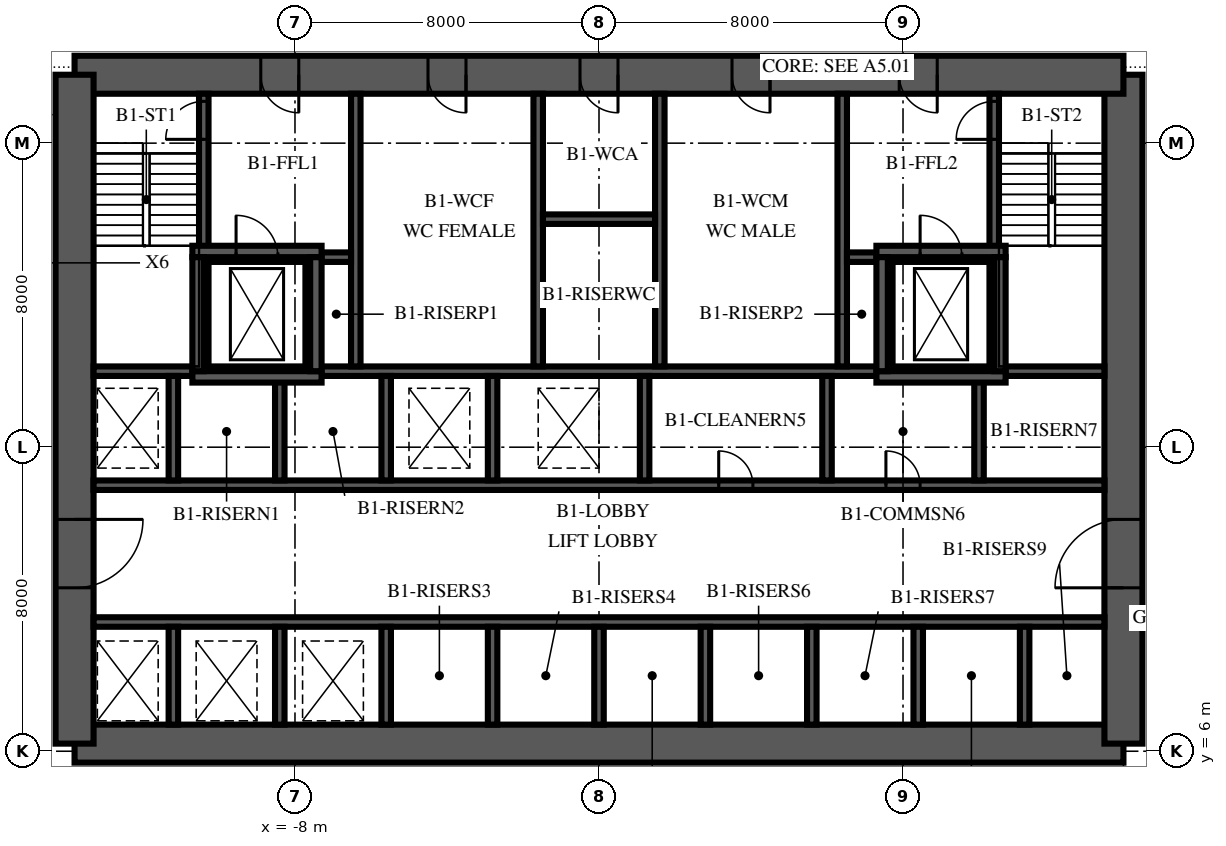
"""IFC4 building model, lengths in metres.
Left out: names, types, materials, properties, quantities, classifications, styles, units other than length and angle.
Written with IfcOpenShell. Run it as: python <this file> out.ifc"""

import sys

from ifc_helpers import new_model, si_unit, direction, frame, frame_2d, origin, place, context, subcontext, project, spatial, polyline, rectangle, outline, extrude, element, fill, save


model = new_model("IFC4")
c1 = context("Model", 3, precision=1e-05, world=origin(), true_north=direction((0.0, 1.0)))
c2 = subcontext(c1, "Body", "Model", "MODEL_VIEW")
j1 = project(units=[si_unit("LENGTHUNIT", "METRE"), si_unit("PLANEANGLEUNIT", "RADIAN")], contexts=[c1])
p1 = place(None, origin())
s1 = spatial("IfcSite", under=j1, at=p1, CompositionType="ELEMENT")
p2 = place(p1, origin())
s2 = spatial("IfcBuilding", under=s1, at=p2, CompositionType="ELEMENT")
p3 = place(p2, frame((0.0, 0.0, -7.0)))
s3 = spatial("IfcBuildingStorey", under=s2, at=p3, CompositionType="ELEMENT", Elevation=-7.0)
p4 = place(p3, frame((-13.8, 6.2, 0.0), z_axis=(0.0, 0.0, 1.0), x_axis=(1.0, 0.0, 0.0)))
e1 = element("IfcWall", 1, at=p4, inside=s3, PredefinedType="SHEAR", context=c2, shape_type="SweptSolid", body=[
    extrude(rectangle(XDim=27.6, YDim=1.0, at=frame_2d((13.8, 0.0))), origin(), (0.0, 0.0, 1.0), 7.0),
])
p5 = place(p3, frame((13.8, 6.2, 0.0), z_axis=(0.0, 0.0, 1.0), x_axis=(0.0, 1.0, 0.0)))
e2 = element("IfcWall", 2, at=p5, inside=s3, PredefinedType="SHEAR", context=c2, shape_type="SweptSolid", body=[
    extrude(outline(polyline([(0.0, -0.5), (17.6, -0.5), (17.6, 0.0), (17.1, 0.0), (17.1, 0.5), (0.5, 0.5), (0.5, 0.0), (0.0, 0.0), (0.0, -0.5)])), origin(), (0.0, 0.0, 1.0), 7.0),
])
p6 = place(p5, frame((4.1, 0.0, 0.0)))
e3 = element("IfcOpeningElement", 3, at=p6, cuts=e2, PredefinedType="OPENING", context=c2, shape_type="SweptSolid", body=[
    extrude(rectangle(XDim=1.8, YDim=2.4, at=frame_2d((0.9, 1.2))), frame((0.0, 0.515, 0.0), z_axis=(0.0, -1.0, 0.0), x_axis=(1.0, 0.0, 0.0)), (0.0, 0.0, 1.0), 1.03),
])
p7 = place(p3, frame((13.8, 23.8, 0.0), z_axis=(0.0, 0.0, 1.0), x_axis=(-1.0, 0.0, 0.0)))
e4 = element("IfcWall", 4, at=p7, inside=s3, PredefinedType="SHEAR", context=c2, shape_type="SweptSolid", body=[
    extrude(rectangle(XDim=27.6, YDim=1.0, at=frame_2d((13.8, 0.0))), origin(), (0.0, 0.0, 1.0), 7.0),
])
p8 = place(p7, frame((21.7, 0.0, 0.0)))
e5 = element("IfcOpeningElement", 5, at=p8, cuts=e4, PredefinedType="OPENING", context=c2, shape_type="SweptSolid", body=[
    extrude(rectangle(XDim=1.0, YDim=2.1, at=frame_2d((0.5, 1.05))), frame((0.0, 0.515, 0.0), z_axis=(0.0, -1.0, 0.0), x_axis=(1.0, 0.0, 0.0)), (0.0, 0.0, 1.0), 1.03),
])
p9 = place(p7, frame((4.9, 0.0, 0.0)))
e6 = element("IfcOpeningElement", 6, at=p9, cuts=e4, PredefinedType="OPENING", context=c2, shape_type="SweptSolid", body=[
    extrude(rectangle(XDim=1.0, YDim=2.1, at=frame_2d((0.5, 1.05))), frame((0.0, 0.515, 0.0), z_axis=(0.0, -1.0, 0.0), x_axis=(1.0, 0.0, 0.0)), (0.0, 0.0, 1.0), 1.03),
])
p10 = place(p7, frame((17.3, 0.0, 0.0)))
e7 = element("IfcOpeningElement", 7, at=p10, cuts=e4, PredefinedType="OPENING", context=c2, shape_type="SweptSolid", body=[
    extrude(rectangle(XDim=1.0, YDim=2.1, at=frame_2d((0.5, 1.05))), frame((0.0, 0.515, 0.0), z_axis=(0.0, -1.0, 0.0), x_axis=(1.0, 0.0, 0.0)), (0.0, 0.0, 1.0), 1.03),
])
p11 = place(p7, frame((13.3, 0.0, 0.0)))
e8 = element("IfcOpeningElement", 8, at=p11, cuts=e4, PredefinedType="OPENING", context=c2, shape_type="SweptSolid", body=[
    extrude(rectangle(XDim=1.0, YDim=2.1, at=frame_2d((0.5, 1.05))), frame((0.0, 0.515, 0.0), z_axis=(0.0, -1.0, 0.0), x_axis=(1.0, 0.0, 0.0)), (0.0, 0.0, 1.0), 1.03),
])
p12 = place(p7, frame((9.3, 0.0, 0.0)))
e9 = element("IfcOpeningElement", 9, at=p12, cuts=e4, PredefinedType="OPENING", context=c2, shape_type="SweptSolid", body=[
    extrude(rectangle(XDim=1.0, YDim=2.1, at=frame_2d((0.5, 1.05))), frame((0.0, 0.515, 0.0), z_axis=(0.0, -1.0, 0.0), x_axis=(1.0, 0.0, 0.0)), (0.0, 0.0, 1.0), 1.03),
])
p13 = place(p3, frame((-13.8, 23.8, 0.0), z_axis=(0.0, 0.0, 1.0), x_axis=(0.0, -1.0, 0.0)))
e10 = element("IfcWall", 10, at=p13, inside=s3, PredefinedType="SHEAR", context=c2, shape_type="SweptSolid", body=[
    extrude(outline(polyline([(0.0, -0.5), (17.6, -0.5), (17.6, 0.0), (17.1, 0.0), (17.1, 0.5), (0.5, 0.5), (0.5, 0.0), (0.0, 0.0), (0.0, -0.5)])), origin(), (0.0, 0.0, 1.0), 7.0),
])
p14 = place(p13, frame((11.7, 0.0, 0.0)))
e11 = element("IfcOpeningElement", 11, at=p14, cuts=e10, PredefinedType="OPENING", context=c2, shape_type="SweptSolid", body=[
    extrude(rectangle(XDim=1.8, YDim=2.4, at=frame_2d((0.9, 1.2))), frame((0.0, 0.515, 0.0), z_axis=(0.0, -1.0, 0.0), x_axis=(1.0, 0.0, 0.0)), (0.0, 0.0, 1.0), 1.03),
])
p15 = place(p3, frame((-13.3, 9.4, 0.0), z_axis=(0.0, 0.0, 1.0), x_axis=(1.0, 0.0, 0.0)))
e12 = element("IfcWall", 12, at=p15, inside=s3, PredefinedType="SHEAR", context=c2, shape_type="SweptSolid", body=[
    extrude(rectangle(XDim=26.6, YDim=0.25, at=frame_2d((13.3, 0.0))), origin(), (0.0, 0.0, 1.0), 7.0),
])
p16 = place(p3, frame((-13.3, 13.0, 0.0), z_axis=(0.0, 0.0, 1.0), x_axis=(1.0, 0.0, 0.0)))
e13 = element("IfcWall", 13, at=p16, inside=s3, PredefinedType="SHEAR", context=c2, shape_type="SweptSolid", body=[
    extrude(rectangle(XDim=26.6, YDim=0.25, at=frame_2d((13.3, 0.0))), origin(), (0.0, 0.0, 1.0), 7.0),
])
p17 = place(p16, frame((16.45, 0.0, 0.0)))
e14 = element("IfcOpeningElement", 14, at=p17, cuts=e13, PredefinedType="OPENING", context=c2, shape_type="SweptSolid", body=[
    extrude(rectangle(XDim=0.9, YDim=2.1, at=frame_2d((0.45, 1.05))), frame((0.0, 0.14, 0.0), z_axis=(0.0, -1.0, 0.0), x_axis=(1.0, 0.0, 0.0)), (0.0, 0.0, 1.0), 0.28),
])
p18 = place(p16, frame((20.85, 0.0, 0.0)))
e15 = element("IfcOpeningElement", 15, at=p18, cuts=e13, PredefinedType="OPENING", context=c2, shape_type="SweptSolid", body=[
    extrude(rectangle(XDim=0.9, YDim=2.1, at=frame_2d((0.45, 1.05))), frame((0.0, 0.14, 0.0), z_axis=(0.0, -1.0, 0.0), x_axis=(1.0, 0.0, 0.0)), (0.0, 0.0, 1.0), 0.28),
])
p19 = place(p3, frame((-13.3, 16.0, 0.0), z_axis=(0.0, 0.0, 1.0), x_axis=(1.0, 0.0, 0.0)))
e16 = element("IfcWall", 16, at=p19, inside=s3, PredefinedType="SHEAR", context=c2, shape_type="SweptSolid", body=[
    extrude(rectangle(XDim=26.6, YDim=0.25, at=frame_2d((13.3, 0.0))), origin(), (0.0, 0.0, 1.0), 7.0),
])
for number, where, z_axis, x_axis in (
    (17, (-11.2, 6.7, 0.0), (0.0, 0.0, 1.0), (0.0, 1.0, 0.0)),
    (18, (-8.4, 6.7, 0.0), (0.0, 0.0, 1.0), (0.0, 1.0, 0.0)),
    (19, (-5.6, 6.7, 0.0), (0.0, 0.0, 1.0), (0.0, 1.0, 0.0)),
    (20, (-2.8, 6.7, 0.0), (0.0, 0.0, 1.0), (0.0, 1.0, 0.0)),
    (21, (0.0, 6.7, 0.0), (0.0, 0.0, 1.0), (0.0, 1.0, 0.0)),
    (22, (2.8, 6.7, 0.0), (0.0, 0.0, 1.0), (0.0, 1.0, 0.0)),
    (23, (5.6, 6.7, 0.0), (0.0, 0.0, 1.0), (0.0, 1.0, 0.0)),
    (24, (8.4, 6.7, 0.0), (0.0, 0.0, 1.0), (0.0, 1.0, 0.0)),
    (25, (11.2, 6.7, 0.0), (0.0, 0.0, 1.0), (0.0, 1.0, 0.0)),
):
    element("IfcWall", number, at=place(p3, frame(where, z_axis=z_axis, x_axis=x_axis)), inside=s3, PredefinedType="SHEAR", context=c2, shape_type="SweptSolid", body=[
        extrude(rectangle(XDim=2.575, YDim=0.25, at=frame_2d((1.288, 0.0))), origin(), (0.0, 0.0, 1.0), 7.0),
    ])
for number, where, z_axis, x_axis in (
    (26, (-11.2, 13.125, 0.0), (0.0, 0.0, 1.0), (0.0, 1.0, 0.0)),
    (27, (-8.4, 13.125, 0.0), (0.0, 0.0, 1.0), (0.0, 1.0, 0.0)),
    (28, (-5.6, 13.125, 0.0), (0.0, 0.0, 1.0), (0.0, 1.0, 0.0)),
    (29, (-2.8, 13.125, 0.0), (0.0, 0.0, 1.0), (0.0, 1.0, 0.0)),
    (30, (1.2, 13.125, 0.0), (0.0, 0.0, 1.0), (0.0, 1.0, 0.0)),
    (31, (6.0, 13.125, 0.0), (0.0, 0.0, 1.0), (0.0, 1.0, 0.0)),
    (32, (10.0, 13.125, 0.0), (0.0, 0.0, 1.0), (0.0, 1.0, 0.0)),
):
    element("IfcWall", number, at=place(p3, frame(where, z_axis=z_axis, x_axis=x_axis)), inside=s3, PredefinedType="SHEAR", context=c2, shape_type="SweptSolid", body=[
        extrude(rectangle(XDim=2.75, YDim=0.25, at=frame_2d((1.375, 0.0))), origin(), (0.0, 0.0, 1.0), 7.0),
    ])
p20 = place(p3, frame((-10.4, 16.125, 0.0), z_axis=(0.0, 0.0, 1.0), x_axis=(0.0, 1.0, 0.0)))
e33 = element("IfcWall", 33, at=p20, inside=s3, PredefinedType="SHEAR", context=c2, shape_type="SweptSolid", body=[
    extrude(rectangle(XDim=7.175, YDim=0.25, at=frame_2d((3.587, 0.0))), origin(), (0.0, 0.0, 1.0), 7.0),
])
p21 = place(p20, frame((5.975, 0.0, 0.0)))
e34 = element("IfcOpeningElement", 34, at=p21, cuts=e33, PredefinedType="OPENING", context=c2, shape_type="SweptSolid", body=[
    extrude(rectangle(XDim=1.0, YDim=2.1, at=frame_2d((0.5, 1.05))), frame((0.0, 0.14, 0.0), z_axis=(0.0, -1.0, 0.0), x_axis=(1.0, 0.0, 0.0)), (0.0, 0.0, 1.0), 0.28),
])
for number, where, z_axis, x_axis in (
    (35, (-6.4, 16.125, 0.0), (0.0, 0.0, 1.0), (0.0, 1.0, 0.0)),
    (36, (-1.6, 16.125, 0.0), (0.0, 0.0, 1.0), (0.0, 1.0, 0.0)),
    (37, (1.6, 16.125, 0.0), (0.0, 0.0, 1.0), (0.0, 1.0, 0.0)),
    (38, (6.4, 16.125, 0.0), (0.0, 0.0, 1.0), (0.0, 1.0, 0.0)),
):
    element("IfcWall", number, at=place(p3, frame(where, z_axis=z_axis, x_axis=x_axis)), inside=s3, PredefinedType="SHEAR", context=c2, shape_type="SweptSolid", body=[
        extrude(rectangle(XDim=7.175, YDim=0.25, at=frame_2d((3.587, 0.0))), origin(), (0.0, 0.0, 1.0), 7.0),
    ])
p22 = place(p3, frame((10.4, 16.125, 0.0), z_axis=(0.0, 0.0, 1.0), x_axis=(0.0, 1.0, 0.0)))
e39 = element("IfcWall", 39, at=p22, inside=s3, PredefinedType="SHEAR", context=c2, shape_type="SweptSolid", body=[
    extrude(rectangle(XDim=7.175, YDim=0.25, at=frame_2d((3.587, 0.0))), origin(), (0.0, 0.0, 1.0), 7.0),
])
p23 = place(p22, frame((5.975, 0.0, 0.0)))
e40 = element("IfcOpeningElement", 40, at=p23, cuts=e39, PredefinedType="OPENING", context=c2, shape_type="SweptSolid", body=[
    extrude(rectangle(XDim=1.0, YDim=2.1, at=frame_2d((0.5, 1.05))), frame((0.0, 0.14, 0.0), z_axis=(0.0, -1.0, 0.0), x_axis=(1.0, 0.0, 0.0)), (0.0, 0.0, 1.0), 0.28),
])
p24 = place(p3, frame((-10.275, 19.0, 0.0), z_axis=(0.0, 0.0, 1.0), x_axis=(1.0, 0.0, 0.0)))
e41 = element("IfcWall", 41, at=p24, inside=s3, PredefinedType="SHEAR", context=c2, shape_type="SweptSolid", body=[
    extrude(rectangle(XDim=3.75, YDim=0.25, at=frame_2d((1.875, 0.0))), origin(), (0.0, 0.0, 1.0), 7.0),
])
p25 = place(p24, frame((0.725, 0.0, 0.0)))
e42 = element("IfcOpeningElement", 42, at=p25, cuts=e41, PredefinedType="OPENING", context=c2, shape_type="SweptSolid", body=[
    extrude(rectangle(XDim=1.1, YDim=2.1, at=frame_2d((0.55, 1.05))), frame((0.0, 0.14, 0.0), z_axis=(0.0, -1.0, 0.0), x_axis=(1.0, 0.0, 0.0)), (0.0, 0.0, 1.0), 0.28),
])
p26 = place(p3, frame((6.525, 19.0, 0.0), z_axis=(0.0, 0.0, 1.0), x_axis=(1.0, 0.0, 0.0)))
e43 = element("IfcWall", 43, at=p26, inside=s3, PredefinedType="SHEAR", context=c2, shape_type="SweptSolid", body=[
    extrude(rectangle(XDim=3.75, YDim=0.25, at=frame_2d((1.875, 0.0))), origin(), (0.0, 0.0, 1.0), 7.0),
])
p27 = place(p26, frame((1.925, 0.0, 0.0)))
e44 = element("IfcOpeningElement", 44, at=p27, cuts=e43, PredefinedType="OPENING", context=c2, shape_type="SweptSolid", body=[
    extrude(rectangle(XDim=1.1, YDim=2.1, at=frame_2d((0.55, 1.05))), frame((0.0, 0.14, 0.0), z_axis=(0.0, -1.0, 0.0), x_axis=(1.0, 0.0, 0.0)), (0.0, 0.0, 1.0), 0.28),
])
for number, where, z_axis, x_axis in (
    (45, (-7.6, 16.125, 0.0), (0.0, 0.0, 1.0), (0.0, 1.0, 0.0)),
    (46, (7.6, 16.125, 0.0), (0.0, 0.0, 1.0), (0.0, 1.0, 0.0)),
):
    element("IfcWall", number, at=place(p3, frame(where, z_axis=z_axis, x_axis=x_axis)), inside=s3, PredefinedType="SHEAR", context=c2, shape_type="SweptSolid", body=[
        extrude(rectangle(XDim=2.75, YDim=0.25, at=frame_2d((1.375, 0.0))), origin(), (0.0, 0.0, 1.0), 7.0),
    ])
p28 = place(p3, frame((-1.475, 20.0, 0.0), z_axis=(0.0, 0.0, 1.0), x_axis=(1.0, 0.0, 0.0)))
e47 = element("IfcWall", 47, at=p28, inside=s3, PredefinedType="SHEAR", context=c2, shape_type="SweptSolid", body=[
    extrude(rectangle(XDim=2.95, YDim=0.25, at=frame_2d((1.475, 0.0))), origin(), (0.0, 0.0, 1.0), 7.0),
])
for number, where, z_axis, x_axis in (
    (48, (7.3, 15.85, -1.4), (0.0, 0.0, 1.0), (1.0, 0.0, 0.0)),
    (49, (7.3, 19.15, -1.4), (0.0, 0.0, 1.0), (1.0, 0.0, 0.0)),
):
    element("IfcWall", number, at=place(p3, frame(where, z_axis=z_axis, x_axis=x_axis)), inside=s3, PredefinedType="SHEAR", context=c2, shape_type="SweptSolid", body=[
        extrude(rectangle(XDim=3.4, YDim=0.3, at=frame_2d((1.7, 0.0))), origin(), (0.0, 0.0, 1.0), 0.8),
    ])
for number, where, z_axis, x_axis in (
    (50, (7.45, 16.0, -1.4), (0.0, 0.0, 1.0), (0.0, 1.0, 0.0)),
    (51, (10.55, 16.0, -1.4), (0.0, 0.0, 1.0), (0.0, 1.0, 0.0)),
):
    element("IfcWall", number, at=place(p3, frame(where, z_axis=z_axis, x_axis=x_axis)), inside=s3, PredefinedType="SHEAR", context=c2, shape_type="SweptSolid", body=[
        extrude(rectangle(XDim=3.0, YDim=0.3, at=frame_2d((1.5, 0.0))), origin(), (0.0, 0.0, 1.0), 0.8),
    ])
for number, where, z_axis, x_axis in (
    (52, (-10.7, 15.85, -1.4), (0.0, 0.0, 1.0), (1.0, 0.0, 0.0)),
    (53, (-10.7, 19.15, -1.4), (0.0, 0.0, 1.0), (1.0, 0.0, 0.0)),
):
    element("IfcWall", number, at=place(p3, frame(where, z_axis=z_axis, x_axis=x_axis)), inside=s3, PredefinedType="SHEAR", context=c2, shape_type="SweptSolid", body=[
        extrude(rectangle(XDim=3.4, YDim=0.3, at=frame_2d((1.7, 0.0))), origin(), (0.0, 0.0, 1.0), 0.8),
    ])
for number, where, z_axis, x_axis in (
    (54, (-10.55, 16.0, -1.4), (0.0, 0.0, 1.0), (0.0, 1.0, 0.0)),
    (55, (-7.45, 16.0, -1.4), (0.0, 0.0, 1.0), (0.0, 1.0, 0.0)),
):
    element("IfcWall", number, at=place(p3, frame(where, z_axis=z_axis, x_axis=x_axis)), inside=s3, PredefinedType="SHEAR", context=c2, shape_type="SweptSolid", body=[
        extrude(rectangle(XDim=3.0, YDim=0.3, at=frame_2d((1.5, 0.0))), origin(), (0.0, 0.0, 1.0), 0.8),
    ])
p29 = place(p6, origin())
e56 = element("IfcDoor", 56, at=p29, inside=s3, OperationType="DOUBLE_DOOR_SINGLE_SWING", PredefinedType="DOOR", context=c2, shape_type="SweptSolid", body=[
    extrude(rectangle(XDim=1.8, YDim=2.4, at=frame_2d((0.9, 1.2))), frame((0.0, 0.5, 0.0), z_axis=(0.0, -1.0, 0.0), x_axis=(1.0, 0.0, 0.0)), (0.0, 0.0, 1.0), 1.0),
])
fill(e3, e56)
p30 = place(p14, origin())
e57 = element("IfcDoor", 57, at=p30, inside=s3, OperationType="DOUBLE_DOOR_SINGLE_SWING", PredefinedType="DOOR", context=c2, shape_type="SweptSolid", body=[
    extrude(rectangle(XDim=1.8, YDim=2.4, at=frame_2d((0.9, 1.2))), frame((0.0, 0.5, 0.0), z_axis=(0.0, -1.0, 0.0), x_axis=(1.0, 0.0, 0.0)), (0.0, 0.0, 1.0), 1.0),
])
fill(e11, e57)
p31 = place(p8, origin())
e58 = element("IfcDoor", 58, at=p31, inside=s3, OperationType="SINGLE_SWING_RIGHT", PredefinedType="DOOR", context=c2, shape_type="SweptSolid", body=[
    extrude(rectangle(XDim=1.0, YDim=2.1, at=frame_2d((0.5, 1.05))), frame((0.0, 0.5, 0.0), z_axis=(0.0, -1.0, 0.0), x_axis=(1.0, 0.0, 0.0)), (0.0, 0.0, 1.0), 1.0),
])
fill(e5, e58)
p32 = place(p9, origin())
e59 = element("IfcDoor", 59, at=p32, inside=s3, OperationType="SINGLE_SWING_RIGHT", PredefinedType="DOOR", context=c2, shape_type="SweptSolid", body=[
    extrude(rectangle(XDim=1.0, YDim=2.1, at=frame_2d((0.5, 1.05))), frame((0.0, 0.5, 0.0), z_axis=(0.0, -1.0, 0.0), x_axis=(1.0, 0.0, 0.0)), (0.0, 0.0, 1.0), 1.0),
])
fill(e6, e59)
p33 = place(p10, origin())
e60 = element("IfcDoor", 60, at=p33, inside=s3, OperationType="SINGLE_SWING_LEFT", PredefinedType="DOOR", context=c2, shape_type="SweptSolid", body=[
    extrude(rectangle(XDim=1.0, YDim=2.1, at=frame_2d((0.5, 1.05))), frame((0.0, 0.5, 0.0), z_axis=(0.0, -1.0, 0.0), x_axis=(1.0, 0.0, 0.0)), (0.0, 0.0, 1.0), 1.0),
])
fill(e7, e60)
p34 = place(p11, origin())
e61 = element("IfcDoor", 61, at=p34, inside=s3, OperationType="SINGLE_SWING_LEFT", PredefinedType="DOOR", context=c2, shape_type="SweptSolid", body=[
    extrude(rectangle(XDim=1.0, YDim=2.1, at=frame_2d((0.5, 1.05))), frame((0.0, 0.5, 0.0), z_axis=(0.0, -1.0, 0.0), x_axis=(1.0, 0.0, 0.0)), (0.0, 0.0, 1.0), 1.0),
])
fill(e8, e61)
p35 = place(p12, origin())
e62 = element("IfcDoor", 62, at=p35, inside=s3, OperationType="SINGLE_SWING_LEFT", PredefinedType="DOOR", context=c2, shape_type="SweptSolid", body=[
    extrude(rectangle(XDim=1.0, YDim=2.1, at=frame_2d((0.5, 1.05))), frame((0.0, 0.5, 0.0), z_axis=(0.0, -1.0, 0.0), x_axis=(1.0, 0.0, 0.0)), (0.0, 0.0, 1.0), 1.0),
])
fill(e9, e62)
p36 = place(p21, origin())
e63 = element("IfcDoor", 63, at=p36, inside=s3, OperationType="SINGLE_SWING_LEFT", PredefinedType="DOOR", context=c2, shape_type="SweptSolid", body=[
    extrude(rectangle(XDim=1.0, YDim=2.1, at=frame_2d((0.5, 1.05))), frame((0.0, 0.125, 0.0), z_axis=(0.0, -1.0, 0.0), x_axis=(1.0, 0.0, 0.0)), (0.0, 0.0, 1.0), 0.25),
])
fill(e34, e63)
p37 = place(p23, origin())
e64 = element("IfcDoor", 64, at=p37, inside=s3, OperationType="SINGLE_SWING_LEFT", PredefinedType="DOOR", context=c2, shape_type="SweptSolid", body=[
    extrude(rectangle(XDim=1.0, YDim=2.1, at=frame_2d((0.5, 1.05))), frame((0.0, 0.125, 0.0), z_axis=(0.0, -1.0, 0.0), x_axis=(1.0, 0.0, 0.0)), (0.0, 0.0, 1.0), 0.25),
])
fill(e40, e64)
p38 = place(p27, origin())
e65 = element("IfcDoor", 65, at=p38, inside=s3, OperationType="SLIDING_TO_RIGHT", PredefinedType="DOOR", context=c2, shape_type="SweptSolid", body=[
    extrude(rectangle(XDim=1.1, YDim=2.1, at=frame_2d((0.55, 1.05))), frame((0.0, 0.125, 0.0), z_axis=(0.0, -1.0, 0.0), x_axis=(1.0, 0.0, 0.0)), (0.0, 0.0, 1.0), 0.25),
])
fill(e44, e65)
p39 = place(p25, origin())
e66 = element("IfcDoor", 66, at=p39, inside=s3, OperationType="SLIDING_TO_RIGHT", PredefinedType="DOOR", context=c2, shape_type="SweptSolid", body=[
    extrude(rectangle(XDim=1.1, YDim=2.1, at=frame_2d((0.55, 1.05))), frame((0.0, 0.125, 0.0), z_axis=(0.0, -1.0, 0.0), x_axis=(1.0, 0.0, 0.0)), (0.0, 0.0, 1.0), 0.25),
])
fill(e42, e66)
p40 = place(p17, origin())
e67 = element("IfcDoor", 67, at=p40, inside=s3, OperationType="SINGLE_SWING_LEFT", PredefinedType="DOOR", context=c2, shape_type="SweptSolid", body=[
    extrude(rectangle(XDim=0.9, YDim=2.1, at=frame_2d((0.45, 1.05))), frame((0.0, 0.125, 0.0), z_axis=(0.0, -1.0, 0.0), x_axis=(1.0, 0.0, 0.0)), (0.0, 0.0, 1.0), 0.25),
])
fill(e14, e67)
p41 = place(p18, origin())
e68 = element("IfcDoor", 68, at=p41, inside=s3, OperationType="SINGLE_SWING_LEFT", PredefinedType="DOOR", context=c2, shape_type="SweptSolid", body=[
    extrude(rectangle(XDim=0.9, YDim=2.1, at=frame_2d((0.45, 1.05))), frame((0.0, 0.125, 0.0), z_axis=(0.0, -1.0, 0.0), x_axis=(1.0, 0.0, 0.0)), (0.0, 0.0, 1.0), 0.25),
])
fill(e15, e68)
save(model, sys.argv[1])
